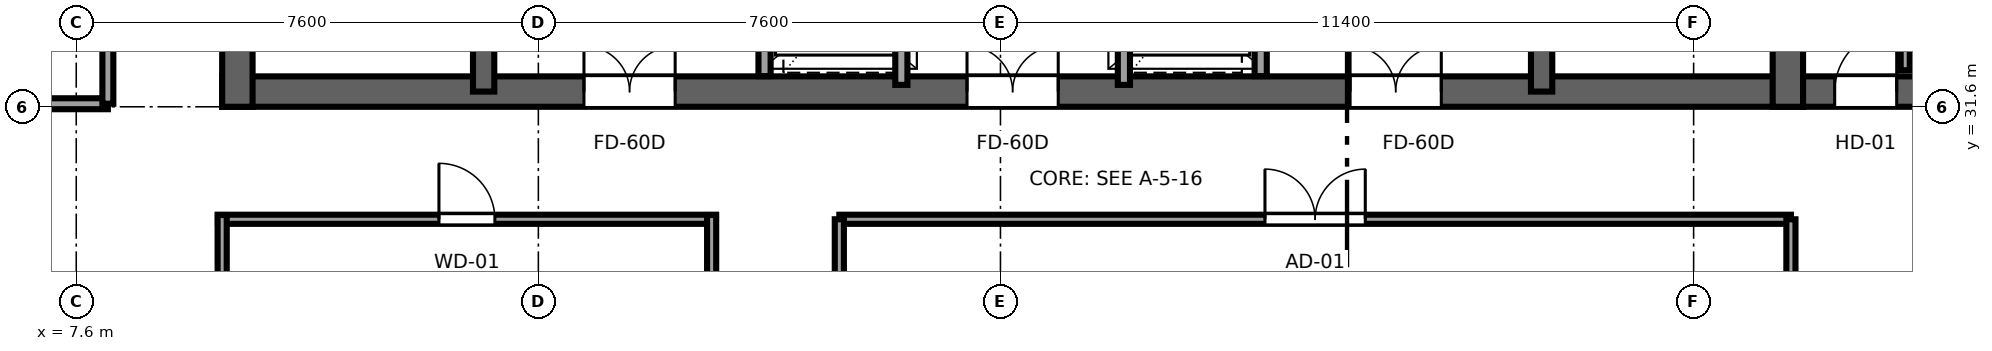
"""IFC4 building model, lengths in metres.
Left out: names, types, materials, properties, quantities, classifications, styles, units other than length and angle.
Written with IfcOpenShell. Run it as: python <this file> out.ifc"""

import sys

from ifc_helpers import new_model, si_unit, direction, frame, frame_2d, origin, place, context, subcontext, project, spatial, rectangle, extrude, source, transform, mapped, element, fill, save


model = new_model("IFC4")
c1 = context("Model", 3, precision=1e-05, world=origin(), true_north=direction((0.0, 1.0)))
c2 = subcontext(c1, "Body", "Model", "MODEL_VIEW")
j1 = project(units=[si_unit("LENGTHUNIT", "METRE"), si_unit("PLANEANGLEUNIT", "RADIAN")], contexts=[c1])
p1 = place(None, origin())
s1 = spatial("IfcSite", under=j1, at=p1, CompositionType="ELEMENT")
p2 = place(p1, origin())
s2 = spatial("IfcBuilding", under=s1, at=p2, CompositionType="ELEMENT")
p3 = place(p2, frame((0.0, 0.0, 209.7)))
s3 = spatial("IfcBuildingStorey", under=s2, at=p3, CompositionType="ELEMENT", Elevation=209.7)
p4 = place(p3, frame((10.0, 31.85, 0.0), z_axis=(0.0, 0.0, 1.0), x_axis=(1.0, 0.0, 0.0)))
e1 = element("IfcWall", 1, at=p4, inside=s3, PredefinedType="SHEAR", context=c2, shape_type="SweptSolid", body=[
    extrude(rectangle(XDim=26.0, YDim=0.5, at=frame_2d((13.0, 0.0))), origin(), (0.0, 0.0, 1.0), 3.55),
])
p5 = place(p4, frame((7.45, 0.0, 0.0), z_axis=(0.0, 0.0, 1.0), x_axis=(-1.0, 0.0, 0.0)))
e2 = element("IfcOpeningElement", 2, at=p5, cuts=e1, PredefinedType="OPENING", context=c2, shape_type="SweptSolid", body=[
    extrude(rectangle(XDim=1.5, YDim=2.04, at=frame_2d((0.75, 1.02))), frame((0.0, 0.26, 0.0), z_axis=(0.0, -1.0, 0.0), x_axis=(1.0, 0.0, 0.0)), (0.0, 0.0, 1.0), 0.52),
])
p6 = place(p4, frame((13.75, 0.0, 0.0), z_axis=(0.0, 0.0, 1.0), x_axis=(-1.0, 0.0, 0.0)))
e3 = element("IfcOpeningElement", 3, at=p6, cuts=e1, PredefinedType="OPENING", context=c2, shape_type="SweptSolid", body=[
    extrude(rectangle(XDim=1.5, YDim=2.04, at=frame_2d((0.75, 1.02))), frame((0.0, 0.26, 0.0), z_axis=(0.0, -1.0, 0.0), x_axis=(1.0, 0.0, 0.0)), (0.0, 0.0, 1.0), 0.52),
])
p7 = place(p4, frame((20.05, 0.0, 0.0), z_axis=(0.0, 0.0, 1.0), x_axis=(-1.0, 0.0, 0.0)))
e4 = element("IfcOpeningElement", 4, at=p7, cuts=e1, PredefinedType="OPENING", context=c2, shape_type="SweptSolid", body=[
    extrude(rectangle(XDim=1.5, YDim=2.04, at=frame_2d((0.75, 1.02))), frame((0.0, 0.26, 0.0), z_axis=(0.0, -1.0, 0.0), x_axis=(1.0, 0.0, 0.0)), (0.0, 0.0, 1.0), 0.52),
])
for number, where, z_axis, x_axis in (
    (5, (10.25, 31.6, 0.0), (0.0, 0.0, 1.0), (0.0, 1.0, 0.0)),
    (6, (35.75, 31.6, 0.0), (0.0, 0.0, 1.0), (0.0, 1.0, 0.0)),
):
    element("IfcWall", number, at=place(p3, frame(where, z_axis=z_axis, x_axis=x_axis)), inside=s3, PredefinedType="SHEAR", context=c2, shape_type="SweptSolid", body=[
        extrude(rectangle(XDim=13.6, YDim=0.5, at=frame_2d((6.8, 0.0))), origin(), (0.0, 0.0, 1.0), 3.55),
    ])
p8 = place(p3, frame((14.3, 31.85, 0.0), z_axis=(0.0, 0.0, 1.0), x_axis=(0.0, 1.0, 0.0)))
e7 = element("IfcWall", 7, at=p8, inside=s3, PredefinedType="SHEAR", context=c2, shape_type="SweptSolid", body=[
    extrude(rectangle(XDim=13.1, YDim=0.35, at=frame_2d((6.55, 0.0))), origin(), (0.0, 0.0, 1.0), 3.55),
])
p9 = place(p8, frame((0.7, 0.0, 0.0)))
e8 = element("IfcOpeningElement", 8, at=p9, cuts=e7, PredefinedType="OPENING", context=c2, shape_type="SweptSolid", body=[
    extrude(rectangle(XDim=1.1, YDim=2.12, at=frame_2d((0.55, 1.06))), frame((0.0, 0.185, 0.0), z_axis=(0.0, -1.0, 0.0), x_axis=(1.0, 0.0, 0.0)), (0.0, 0.0, 1.0), 0.37),
])
p10 = place(p3, frame((31.7, 31.85, 0.0), z_axis=(0.0, 0.0, 1.0), x_axis=(0.0, 1.0, 0.0)))
e9 = element("IfcWall", 9, at=p10, inside=s3, PredefinedType="SHEAR", context=c2, shape_type="SweptSolid", body=[
    extrude(rectangle(XDim=13.1, YDim=0.35, at=frame_2d((6.55, 0.0))), origin(), (0.0, 0.0, 1.0), 3.55),
])
p11 = place(p10, frame((1.8, 0.0, 0.0), z_axis=(0.0, 0.0, 1.0), x_axis=(-1.0, 0.0, 0.0)))
e10 = element("IfcOpeningElement", 10, at=p11, cuts=e9, PredefinedType="OPENING", context=c2, shape_type="SweptSolid", body=[
    extrude(rectangle(XDim=1.1, YDim=2.12, at=frame_2d((0.55, 1.06))), frame((0.0, 0.185, 0.0), z_axis=(0.0, -1.0, 0.0), x_axis=(1.0, 0.0, 0.0)), (0.0, 0.0, 1.0), 0.37),
])
p12 = place(p3, frame((36.0, 31.85, 0.0), z_axis=(0.0, 0.0, 1.0), x_axis=(1.0, 0.0, 0.0)))
e11 = element("IfcWall", 11, at=p12, inside=s3, PredefinedType="SHEAR", context=c2, shape_type="SweptSolid", body=[
    extrude(rectangle(XDim=3.8, YDim=0.5, at=frame_2d((1.9, 0.0))), origin(), (0.0, 0.0, 1.0), 3.55),
])
p13 = place(p12, frame((1.54, 0.0, 0.0), z_axis=(0.0, 0.0, 1.0), x_axis=(-1.0, 0.0, 0.0)))
e12 = element("IfcOpeningElement", 12, at=p13, cuts=e11, PredefinedType="OPENING", context=c2, shape_type="SweptSolid", body=[
    extrude(rectangle(XDim=1.02, YDim=2.03, at=frame_2d((0.51, 1.015))), frame((0.0, 0.26, 0.0), z_axis=(0.0, -1.0, 0.0), x_axis=(1.0, 0.0, 0.0)), (0.0, 0.0, 1.0), 0.52),
])
for number, where, z_axis, x_axis in (
    (13, (18.92, 32.104, 0.0), (0.0, 0.0, 1.0), (0.0, 1.0, 0.0)),
    (14, (27.08, 32.104, 0.0), (0.0, 0.0, 1.0), (0.0, 1.0, 0.0)),
):
    element("IfcWall", number, at=place(p3, frame(where, z_axis=z_axis, x_axis=x_axis)), inside=s3, PredefinedType="SOLIDWALL", context=c2, shape_type="SweptSolid", body=[
        extrude(rectangle(XDim=4.046, YDim=0.2, at=frame_2d((2.023, 0.0))), origin(), (0.0, 0.0, 1.0), 3.37),
    ])
p14 = place(p3, frame((21.17, 31.96, 0.0), z_axis=(0.0, 0.0, 1.0), x_axis=(0.0, 1.0, 0.0)))
e15 = element("IfcWall", 15, at=p14, inside=s3, PredefinedType="SOLIDWALL", context=c2, shape_type="SweptSolid", body=[
    extrude(rectangle(XDim=5.08, YDim=0.2, at=frame_2d((2.54, 0.0))), origin(), (0.0, 0.0, 1.0), 3.37),
])
p15 = place(p14, frame((0.74, 0.0, 0.0)))
e16 = element("IfcOpeningElement", 16, at=p15, cuts=e15, PredefinedType="OPENING", context=c2, shape_type="SweptSolid", body=[
    extrude(rectangle(XDim=1.1, YDim=2.12, at=frame_2d((0.55, 1.06))), frame((0.0, 0.11, 0.0), z_axis=(0.0, -1.0, 0.0), x_axis=(1.0, 0.0, 0.0)), (0.0, 0.0, 1.0), 0.22),
])
p16 = place(p14, frame((3.24, 0.0, 0.0)))
e17 = element("IfcOpeningElement", 17, at=p16, cuts=e15, PredefinedType="OPENING", context=c2, shape_type="SweptSolid", body=[
    extrude(rectangle(XDim=1.1, YDim=2.12, at=frame_2d((0.55, 1.06))), frame((0.0, 0.11, 0.0), z_axis=(0.0, -1.0, 0.0), x_axis=(1.0, 0.0, 0.0)), (0.0, 0.0, 1.0), 0.22),
])
p17 = place(p3, frame((24.83, 31.96, 0.0), z_axis=(0.0, 0.0, 1.0), x_axis=(0.0, 1.0, 0.0)))
e18 = element("IfcWall", 18, at=p17, inside=s3, PredefinedType="SOLIDWALL", context=c2, shape_type="SweptSolid", body=[
    extrude(rectangle(XDim=5.08, YDim=0.2, at=frame_2d((2.54, 0.0))), origin(), (0.0, 0.0, 1.0), 3.37),
])
p18 = place(p17, frame((0.74, 0.0, 0.0)))
e19 = element("IfcOpeningElement", 19, at=p18, cuts=e18, PredefinedType="OPENING", context=c2, shape_type="SweptSolid", body=[
    extrude(rectangle(XDim=1.1, YDim=2.12, at=frame_2d((0.55, 1.06))), frame((0.0, 0.11, 0.0), z_axis=(0.0, -1.0, 0.0), x_axis=(1.0, 0.0, 0.0)), (0.0, 0.0, 1.0), 0.22),
])
p19 = place(p17, frame((3.24, 0.0, 0.0)))
e20 = element("IfcOpeningElement", 20, at=p19, cuts=e18, PredefinedType="OPENING", context=c2, shape_type="SweptSolid", body=[
    extrude(rectangle(XDim=1.1, YDim=2.12, at=frame_2d((0.55, 1.06))), frame((0.0, 0.11, 0.0), z_axis=(0.0, -1.0, 0.0), x_axis=(1.0, 0.0, 0.0)), (0.0, 0.0, 1.0), 0.22),
])
p20 = place(p3, frame((37.68, 32.2, 0.0), z_axis=(0.0, 0.0, 1.0), x_axis=(0.0, 1.0, 0.0)))
e21 = element("IfcWall", 21, at=p20, inside=s3, PredefinedType="PARTITIONING", context=c2, shape_type="SweptSolid", body=[
    extrude(rectangle(XDim=4.0, YDim=0.15, at=frame_2d((2.0, 0.0))), origin(), (0.0, 0.0, 1.0), 3.37),
])
p21 = place(p20, frame((1.49, 0.0, 0.0)))
e22 = element("IfcOpeningElement", 22, at=p21, cuts=e21, PredefinedType="OPENING", context=c2, shape_type="SweptSolid", body=[
    extrude(rectangle(XDim=1.02, YDim=2.03, at=frame_2d((0.51, 1.015))), frame((0.0, 0.085, 0.0), z_axis=(0.0, -1.0, 0.0), x_axis=(1.0, 0.0, 0.0)), (0.0, 0.0, 1.0), 0.17),
])
p22 = place(p3, frame((3.005, 31.65, 0.0), z_axis=(0.0, 0.0, 1.0), x_axis=(1.0, 0.0, 0.0)))
e23 = element("IfcWall", 23, at=p22, inside=s3, PredefinedType="PARTITIONING", context=c2, shape_type="SweptSolid", body=[
    extrude(rectangle(XDim=5.115, YDim=0.18, at=frame_2d((2.558, 0.0))), origin(), (0.0, 0.0, 1.0), 3.37),
])
p23 = place(p3, frame((8.12, 31.65, 0.0), z_axis=(0.0, 0.0, 1.0), x_axis=(0.0, 1.0, 0.0)))
e24 = element("IfcWall", 24, at=p23, inside=s3, PredefinedType="PARTITIONING", context=c2, shape_type="SweptSolid", body=[
    extrude(rectangle(XDim=6.55, YDim=0.18, at=frame_2d((3.275, 0.0))), origin(), (0.0, 0.0, 1.0), 3.37),
])
p24 = place(p23, frame((2.75, 0.0, 0.0)))
e25 = element("IfcOpeningElement", 25, at=p24, cuts=e24, PredefinedType="OPENING", context=c2, shape_type="SweptSolid", body=[
    extrude(rectangle(XDim=1.65, YDim=2.15, at=frame_2d((0.825, 1.075))), frame((0.0, 0.1, 0.0), z_axis=(0.0, -1.0, 0.0), x_axis=(1.0, 0.0, 0.0)), (0.0, 0.0, 1.0), 0.2),
])
p25 = place(p3, frame((9.93, 29.75, 0.0), z_axis=(0.0, 0.0, 1.0), x_axis=(1.0, 0.0, 0.0)))
e26 = element("IfcWall", 26, at=p25, inside=s3, PredefinedType="PARTITIONING", context=c2, shape_type="SweptSolid", body=[
    extrude(rectangle(XDim=8.19, YDim=0.15, at=frame_2d((4.095, 0.0))), origin(), (0.0, 0.0, 1.0), 3.37),
])
p26 = place(p25, frame((3.635, 0.0, 0.0)))
e27 = element("IfcOpeningElement", 27, at=p26, cuts=e26, PredefinedType="OPENING", context=c2, shape_type="SweptSolid", body=[
    extrude(rectangle(XDim=0.92, YDim=2.01, at=frame_2d((0.46, 1.005))), frame((0.0, 0.085, 0.0), z_axis=(0.0, -1.0, 0.0), x_axis=(1.0, 0.0, 0.0)), (0.0, 0.0, 1.0), 0.17),
])
for number, where, z_axis, x_axis in (
    (28, (10.0, 27.03, 0.0), (0.0, 0.0, 1.0), (0.0, 1.0, 0.0)),
    (29, (18.05, 27.03, 0.0), (0.0, 0.0, 1.0), (0.0, 1.0, 0.0)),
):
    element("IfcWall", number, at=place(p3, frame(where, z_axis=z_axis, x_axis=x_axis)), inside=s3, PredefinedType="PARTITIONING", context=c2, shape_type="SweptSolid", body=[
        extrude(rectangle(XDim=2.79, YDim=0.15, at=frame_2d((1.395, 0.0))), origin(), (0.0, 0.0, 1.0), 3.37),
    ])
p27 = place(p3, frame((20.15, 29.75, 0.0), z_axis=(0.0, 0.0, 1.0), x_axis=(1.0, 0.0, 0.0)))
e30 = element("IfcWall", 30, at=p27, inside=s3, PredefinedType="PARTITIONING", context=c2, shape_type="SweptSolid", body=[
    extrude(rectangle(XDim=15.65, YDim=0.15, at=frame_2d((7.825, 0.0))), origin(), (0.0, 0.0, 1.0), 3.37),
])
p28 = place(p27, frame((7.0, 0.0, 0.0)))
e31 = element("IfcOpeningElement", 31, at=p28, cuts=e30, PredefinedType="OPENING", context=c2, shape_type="SweptSolid", body=[
    extrude(rectangle(XDim=1.65, YDim=2.15, at=frame_2d((0.825, 1.075))), frame((0.0, 0.085, 0.0), z_axis=(0.0, -1.0, 0.0), x_axis=(1.0, 0.0, 0.0)), (0.0, 0.0, 1.0), 0.17),
])
for number, where, z_axis, x_axis in (
    (32, (20.15, 25.0, 0.0), (0.0, 0.0, 1.0), (0.0, 1.0, 0.0)),
    (33, (35.8, 25.0, 0.0), (0.0, 0.0, 1.0), (0.0, 1.0, 0.0)),
):
    element("IfcWall", number, at=place(p3, frame(where, z_axis=z_axis, x_axis=x_axis)), inside=s3, PredefinedType="PARTITIONING", context=c2, shape_type="SweptSolid", body=[
        extrude(rectangle(XDim=4.75, YDim=0.15, at=frame_2d((2.375, 0.0))), origin(), (0.0, 0.0, 1.0), 3.37),
    ])
m1 = source(origin(), c2, "Body", "SweptSolid", [
    extrude(rectangle(XDim=1.5, YDim=2.04, at=frame_2d((0.75, 1.02))), frame((0.0, 0.025, 0.0), z_axis=(0.0, -1.0, 0.0), x_axis=(1.0, 0.0, 0.0)), (0.0, 0.0, 1.0), 0.05),
])
p29 = place(p5, origin())
e34 = element("IfcDoor", 34, at=p29, inside=s3, OperationType="DOUBLE_DOOR_SINGLE_SWING", PredefinedType="DOOR", context=c2, shape_type="MappedRepresentation", body=[
    mapped(m1, transform((0.0, 0.0, 0.0), x_axis=(1.0, 0.0, 0.0), y_axis=(0.0, 1.0, 0.0), z_axis=(0.0, 0.0, 1.0), scale=1.0)),
])
fill(e2, e34)
p30 = place(p6, origin())
e35 = element("IfcDoor", 35, at=p30, inside=s3, OperationType="DOUBLE_DOOR_SINGLE_SWING", PredefinedType="DOOR", context=c2, shape_type="MappedRepresentation", body=[
    mapped(m1, transform((0.0, 0.0, 0.0), x_axis=(1.0, 0.0, 0.0), y_axis=(0.0, 1.0, 0.0), z_axis=(0.0, 0.0, 1.0), scale=1.0)),
])
fill(e3, e35)
p31 = place(p7, origin())
e36 = element("IfcDoor", 36, at=p31, inside=s3, OperationType="DOUBLE_DOOR_SINGLE_SWING", PredefinedType="DOOR", context=c2, shape_type="MappedRepresentation", body=[
    mapped(m1, transform((0.0, 0.0, 0.0), x_axis=(1.0, 0.0, 0.0), y_axis=(0.0, 1.0, 0.0), z_axis=(0.0, 0.0, 1.0), scale=1.0)),
])
fill(e4, e36)
m2 = source(origin(), c2, "Body", "SweptSolid", [
    extrude(rectangle(XDim=1.02, YDim=2.03, at=frame_2d((0.51, 1.015))), frame((0.0, 0.025, 0.0), z_axis=(0.0, -1.0, 0.0), x_axis=(1.0, 0.0, 0.0)), (0.0, 0.0, 1.0), 0.05),
])
p32 = place(p13, origin())
e37 = element("IfcDoor", 37, at=p32, inside=s3, OperationType="SINGLE_SWING_RIGHT", PredefinedType="DOOR", context=c2, shape_type="MappedRepresentation", body=[
    mapped(m2, transform((0.0, 0.0, 0.0), x_axis=(1.0, 0.0, 0.0), y_axis=(0.0, 1.0, 0.0), z_axis=(0.0, 0.0, 1.0), scale=1.0)),
])
fill(e12, e37)
m3 = source(origin(), c2, "Body", "SweptSolid", [
    extrude(rectangle(XDim=0.92, YDim=2.01, at=frame_2d((0.46, 1.005))), frame((0.0, 0.025, 0.0), z_axis=(0.0, -1.0, 0.0), x_axis=(1.0, 0.0, 0.0)), (0.0, 0.0, 1.0), 0.05),
])
p33 = place(p26, origin())
e38 = element("IfcDoor", 38, at=p33, inside=s3, OperationType="SINGLE_SWING_LEFT", PredefinedType="DOOR", context=c2, shape_type="MappedRepresentation", body=[
    mapped(m3, transform((0.0, 0.0, 0.0), x_axis=(1.0, 0.0, 0.0), y_axis=(0.0, 1.0, 0.0), z_axis=(0.0, 0.0, 1.0), scale=1.0)),
])
fill(e27, e38)
m4 = source(origin(), c2, "Body", "SweptSolid", [
    extrude(rectangle(XDim=1.65, YDim=2.15, at=frame_2d((0.825, 1.075))), frame((0.0, 0.025, 0.0), z_axis=(0.0, -1.0, 0.0), x_axis=(1.0, 0.0, 0.0)), (0.0, 0.0, 1.0), 0.05),
])
p34 = place(p28, origin())
e39 = element("IfcDoor", 39, at=p34, inside=s3, OperationType="DOUBLE_DOOR_SINGLE_SWING", PredefinedType="DOOR", context=c2, shape_type="MappedRepresentation", body=[
    mapped(m4, transform((0.0, 0.0, 0.0), x_axis=(1.0, 0.0, 0.0), y_axis=(0.0, 1.0, 0.0), z_axis=(0.0, 0.0, 1.0), scale=1.0)),
])
fill(e31, e39)
save(model, sys.argv[1])
